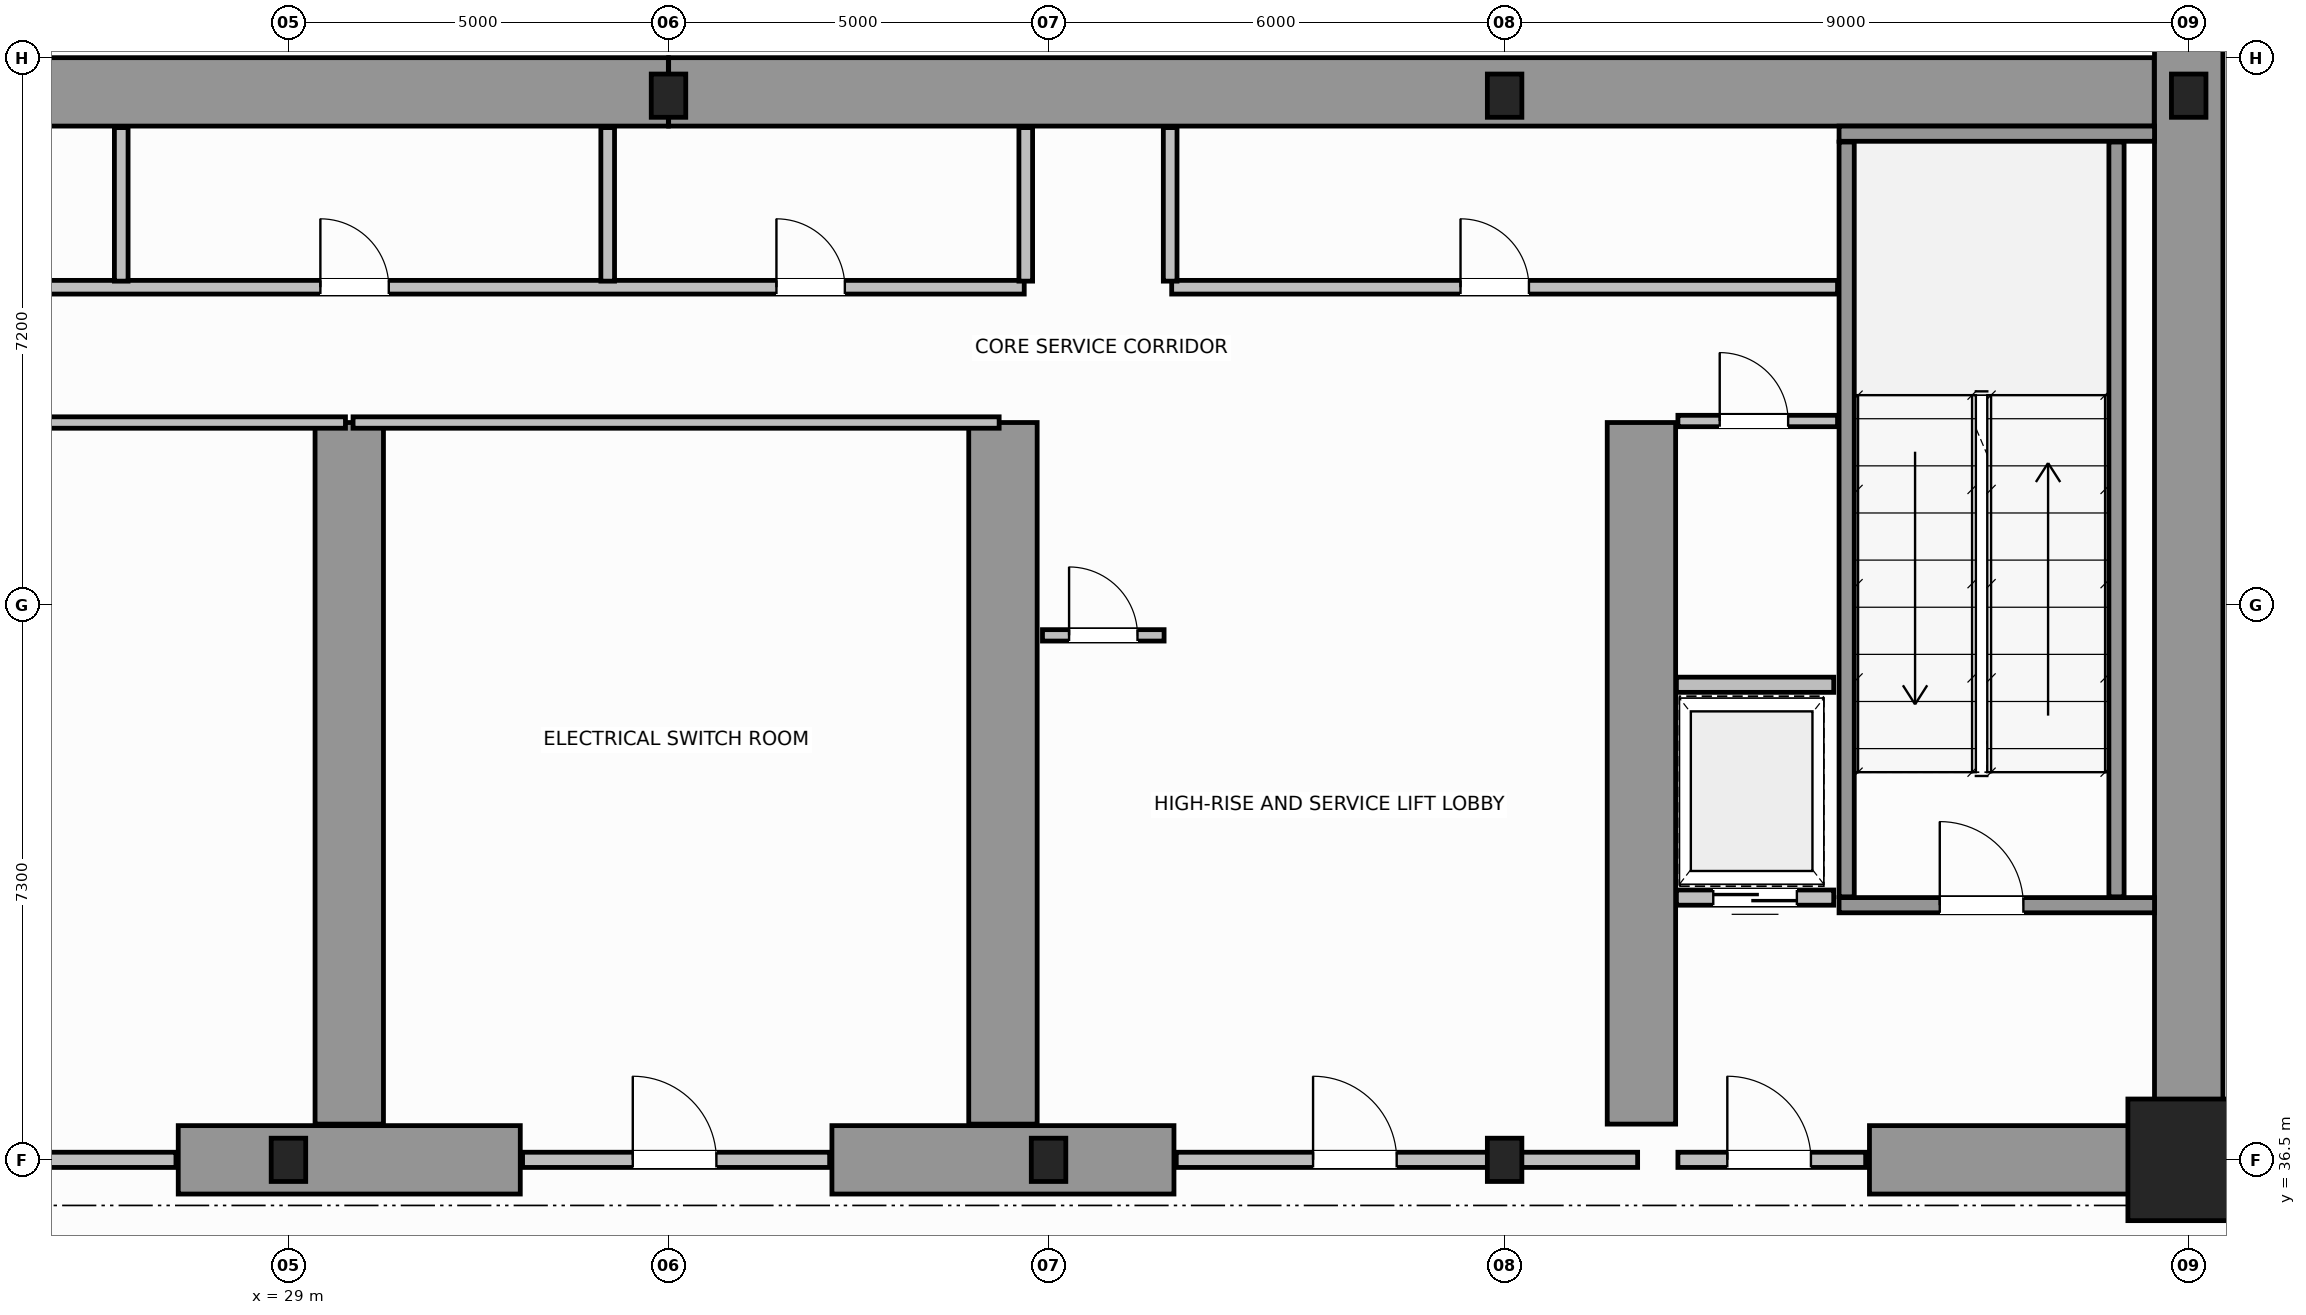
"""IFC4 building model, lengths in metres.
Left out: names, types, materials, properties, quantities, classifications, styles, units other than length and angle.
Written with IfcOpenShell. Run it as: python <this file> out.ifc"""

import sys

from ifc_helpers import new_model, si_unit, direction, frame, frame_2d, origin, origin_2d, place, context, subcontext, project, spatial, rectangle, i_section, extrude, source, transform, mapped, element, fill, save


model = new_model("IFC4")
c1 = context("Model", 3, precision=1e-05, world=origin(), true_north=direction((0.0, 1.0)))
c2 = subcontext(c1, "Body", "Model", "MODEL_VIEW")
j1 = project(units=[si_unit("LENGTHUNIT", "METRE"), si_unit("PLANEANGLEUNIT", "RADIAN")], contexts=[c1])
p1 = place(None, origin())
s1 = spatial("IfcSite", under=j1, at=p1, CompositionType="ELEMENT")
p2 = place(p1, origin())
s2 = spatial("IfcBuilding", under=s1, at=p2, CompositionType="ELEMENT")
p3 = place(p2, frame((0.0, 0.0, -10.4)))
s3 = spatial("IfcBuildingStorey", under=s2, at=p3, CompositionType="ELEMENT", Elevation=-10.4)
m1 = source(origin(), c2, "Body", "SweptSolid", [
    extrude(i_section(OverallWidth=0.454, OverallDepth=0.569, WebThickness=0.078, FlangeThickness=0.08, FilletRadius=0.015, at=origin_2d()), origin(), (0.0, 0.0, 1.0), 5.2),
])
for number, where, z_axis, x_axis in (
    (1, (29.0, 36.5, 0.0), (0.0, 0.0, 1.0), (1.0, 0.0, 0.0)),
    (2, (39.0, 36.5, 0.0), (0.0, 0.0, 1.0), (1.0, 0.0, 0.0)),
    (3, (45.0, 36.5, 0.0), (0.0, 0.0, 1.0), (1.0, 0.0, 0.0)),
):
    element("IfcColumn", number, at=place(p3, frame(where, z_axis=z_axis, x_axis=x_axis)), inside=s3, PredefinedType="COLUMN", context=c2, shape_type="MappedRepresentation", body=[
        mapped(m1, transform((0.0, 0.0, 0.0), scale=1.0)),
    ])
m2 = source(origin(), c2, "Body", "SweptSolid", [
    extrude(rectangle(XDim=1.6, YDim=1.6, at=origin_2d()), origin(), (0.0, 0.0, 1.0), 5.2),
])
p4 = place(p3, frame((54.0, 36.5, 0.0), z_axis=(0.0, 0.0, 1.0), x_axis=(1.0, 0.0, 0.0)))
e4 = element("IfcColumn", 4, at=p4, inside=s3, PredefinedType="COLUMN", context=c2, shape_type="MappedRepresentation", body=[
    mapped(m2, transform((0.0, 0.0, 0.0), scale=1.0)),
])
for number, where, z_axis, x_axis in (
    (5, (34.0, 50.5, 0.0), (0.0, 0.0, 1.0), (1.0, 0.0, 0.0)),
    (6, (45.0, 50.5, 0.0), (0.0, 0.0, 1.0), (1.0, 0.0, 0.0)),
    (7, (54.0, 50.5, 0.0), (0.0, 0.0, 1.0), (1.0, 0.0, 0.0)),
):
    element("IfcColumn", number, at=place(p3, frame(where, z_axis=z_axis, x_axis=x_axis)), inside=s3, PredefinedType="COLUMN", context=c2, shape_type="MappedRepresentation", body=[
        mapped(m1, transform((0.0, 0.0, 0.0), scale=1.0)),
    ])
for number, where, z_axis, x_axis in (
    (8, (14.454, 50.55, 0.0), (0.0, 0.0, 1.0), (1.0, 0.0, 0.0)),
    (9, (34.002, 50.55, 0.0), (0.0, 0.0, 1.0), (1.0, 0.0, 0.0)),
):
    element("IfcWall", number, at=place(p3, frame(where, z_axis=z_axis, x_axis=x_axis)), inside=s3, PredefinedType="SHEAR", context=c2, shape_type="SweptSolid", body=[
        extrude(rectangle(XDim=19.544, YDim=0.9, at=frame_2d((9.772, 0.0))), origin(), (0.0, 0.0, 1.0), 5.2),
    ])
p5 = place(p3, frame((54.0, 36.5, 0.0), z_axis=(0.0, 0.0, 1.0), x_axis=(0.0, 1.0, 0.0)))
e10 = element("IfcWall", 10, at=p5, inside=s3, PredefinedType="SHEAR", context=c2, shape_type="SweptSolid", body=[
    extrude(rectangle(XDim=15.0, YDim=0.9, at=frame_2d((7.5, 0.0))), origin(), (0.0, 0.0, 1.0), 5.2),
])
for number, where, z_axis, x_axis in (
    (11, (27.55, 36.5, 0.0), (0.0, 0.0, 1.0), (1.0, 0.0, 0.0)),
    (12, (36.15, 36.5, 0.0), (0.0, 0.0, 1.0), (1.0, 0.0, 0.0)),
):
    element("IfcWall", number, at=place(p3, frame(where, z_axis=z_axis, x_axis=x_axis)), inside=s3, PredefinedType="SHEAR", context=c2, shape_type="SweptSolid", body=[
        extrude(rectangle(XDim=4.5, YDim=0.9, at=frame_2d((2.25, 0.0))), origin(), (0.0, 0.0, 1.0), 5.2),
    ])
p6 = place(p3, frame((49.8, 36.5, 0.0), z_axis=(0.0, 0.0, 1.0), x_axis=(1.0, 0.0, 0.0)))
e13 = element("IfcWall", 13, at=p6, inside=s3, PredefinedType="SHEAR", context=c2, shape_type="SweptSolid", body=[
    extrude(rectangle(XDim=3.73, YDim=0.9, at=frame_2d((1.865, 0.0))), origin(), (0.0, 0.0, 1.0), 3.68),
])
for number, where, z_axis, x_axis in (
    (14, (29.8, 36.97, 0.0), (0.0, 0.0, 1.0), (0.0, 1.0, 0.0)),
    (15, (38.4, 36.97, 0.0), (0.0, 0.0, 1.0), (0.0, 1.0, 0.0)),
    (16, (46.8, 36.97, 0.0), (0.0, 0.0, 1.0), (0.0, 1.0, 0.0)),
):
    element("IfcWall", number, at=place(p3, frame(where, z_axis=z_axis, x_axis=x_axis)), inside=s3, PredefinedType="SHEAR", context=c2, shape_type="SweptSolid", body=[
        extrude(rectangle(XDim=9.23, YDim=0.9, at=frame_2d((4.615, 0.0))), origin(), (0.0, 0.0, 1.0), 5.2),
    ])
p7 = place(p3, frame((49.4, 39.85, 0.0), z_axis=(0.0, 0.0, 1.0), x_axis=(1.0, 0.0, 0.0)))
e17 = element("IfcWall", 17, at=p7, inside=s3, PredefinedType="SOLIDWALL", context=c2, shape_type="SweptSolid", body=[
    extrude(rectangle(XDim=4.15, YDim=0.2, at=frame_2d((2.075, 0.0))), origin(), (0.0, 0.0, 1.0), 5.2),
])
p8 = place(p7, frame((1.325, 0.0, 0.0)))
e18 = element("IfcOpeningElement", 18, at=p8, cuts=e17, PredefinedType="OPENING", context=c2, shape_type="SweptSolid", body=[
    extrude(rectangle(XDim=1.1, YDim=2.15, at=frame_2d((0.55, 1.075))), frame((0.0, 0.11, 0.0), z_axis=(0.0, -1.0, 0.0), x_axis=(1.0, 0.0, 0.0)), (0.0, 0.0, 1.0), 0.22),
])
p9 = place(p3, frame((49.4, 50.0, 0.0), z_axis=(0.0, 0.0, 1.0), x_axis=(1.0, 0.0, 0.0)))
e19 = element("IfcWall", 19, at=p9, inside=s3, PredefinedType="SOLIDWALL", context=c2, shape_type="SweptSolid", body=[
    extrude(rectangle(XDim=4.15, YDim=0.2, at=frame_2d((2.075, 0.0))), origin(), (0.0, 0.0, 1.0), 5.2),
])
for number, where, z_axis, x_axis in (
    (20, (49.5, 39.96, 0.0), (0.0, 0.0, 1.0), (0.0, 1.0, 0.0)),
    (21, (53.05, 39.96, 0.0), (0.0, 0.0, 1.0), (0.0, 1.0, 0.0)),
):
    element("IfcWall", number, at=place(p3, frame(where, z_axis=z_axis, x_axis=x_axis)), inside=s3, PredefinedType="SOLIDWALL", context=c2, shape_type="SweptSolid", body=[
        extrude(rectangle(XDim=9.93, YDim=0.2, at=frame_2d((4.965, 0.0))), origin(), (0.0, 0.0, 1.0), 5.2),
    ])
p10 = place(p3, frame((47.28, 36.5, 0.0), z_axis=(0.0, 0.0, 1.0), x_axis=(1.0, 0.0, 0.0)))
e22 = element("IfcWall", 22, at=p10, inside=s3, PredefinedType="SOLIDWALL", context=c2, shape_type="SweptSolid", body=[
    extrude(rectangle(XDim=2.47, YDim=0.2, at=frame_2d((1.235, 0.0))), origin(), (0.0, 0.0, 1.0), 3.67),
])
p11 = place(p10, frame((0.65, 0.0, 0.0)))
e23 = element("IfcOpeningElement", 23, at=p11, cuts=e22, PredefinedType="OPENING", context=c2, shape_type="SweptSolid", body=[
    extrude(rectangle(XDim=1.1, YDim=2.15, at=frame_2d((0.55, 1.075))), frame((0.0, 0.11, 0.0), z_axis=(0.0, -1.0, 0.0), x_axis=(1.0, 0.0, 0.0)), (0.0, 0.0, 1.0), 0.22),
])
p12 = place(p3, frame((47.26, 39.95, 0.0), z_axis=(0.0, 0.0, 1.0), x_axis=(1.0, 0.0, 0.0)))
e24 = element("IfcWall", 24, at=p12, inside=s3, PredefinedType="SOLIDWALL", context=c2, shape_type="SweptSolid", body=[
    extrude(rectangle(XDim=2.07, YDim=0.2, at=frame_2d((1.035, 0.0))), origin(), (0.0, 0.0, 1.0), 4.88),
])
p13 = place(p12, frame((0.485, 0.0, 0.0)))
e25 = element("IfcOpeningElement", 25, at=p13, cuts=e24, PredefinedType="OPENING", context=c2, shape_type="SweptSolid", body=[
    extrude(rectangle(XDim=1.1, YDim=2.15, at=frame_2d((0.55, 1.075))), frame((0.0, 0.11, 0.0), z_axis=(0.0, -1.0, 0.0), x_axis=(1.0, 0.0, 0.0)), (0.0, 0.0, 1.0), 0.22),
])
p14 = place(p3, frame((47.26, 42.75, 0.0), z_axis=(0.0, 0.0, 1.0), x_axis=(1.0, 0.0, 0.0)))
e26 = element("IfcWall", 26, at=p14, inside=s3, PredefinedType="SOLIDWALL", context=c2, shape_type="SweptSolid", body=[
    extrude(rectangle(XDim=2.07, YDim=0.2, at=frame_2d((1.035, 0.0))), origin(), (0.0, 0.0, 1.0), 4.88),
])
p15 = place(p3, frame((21.25, 36.5, 0.0), z_axis=(0.0, 0.0, 1.0), x_axis=(1.0, 0.0, 0.0)))
e27 = element("IfcWall", 27, at=p15, inside=s3, PredefinedType="SOLIDWALL", context=c2, shape_type="SweptSolid", body=[
    extrude(rectangle(XDim=6.27, YDim=0.2, at=frame_2d((3.135, 0.0))), origin(), (0.0, 0.0, 1.0), 3.67),
])
p16 = place(p15, frame((2.6, 0.0, 0.0)))
e28 = element("IfcOpeningElement", 28, at=p16, cuts=e27, PredefinedType="OPENING", context=c2, shape_type="SweptSolid", body=[
    extrude(rectangle(XDim=1.1, YDim=2.15, at=frame_2d((0.55, 1.075))), frame((0.0, 0.11, 0.0), z_axis=(0.0, -1.0, 0.0), x_axis=(1.0, 0.0, 0.0)), (0.0, 0.0, 1.0), 0.22),
])
p17 = place(p3, frame((21.25, 46.2, 0.0), z_axis=(0.0, 0.0, 1.0), x_axis=(1.0, 0.0, 0.0)))
e29 = element("IfcWall", 29, at=p17, inside=s3, PredefinedType="PARTITIONING", context=c2, shape_type="SweptSolid", body=[
    extrude(rectangle(XDim=8.5, YDim=0.15, at=frame_2d((4.25, 0.0))), origin(), (0.0, 0.0, 1.0), 4.88),
])
p18 = place(p3, frame((32.08, 36.5, 0.0), z_axis=(0.0, 0.0, 1.0), x_axis=(1.0, 0.0, 0.0)))
e30 = element("IfcWall", 30, at=p18, inside=s3, PredefinedType="SOLIDWALL", context=c2, shape_type="SweptSolid", body=[
    extrude(rectangle(XDim=4.04, YDim=0.2, at=frame_2d((2.02, 0.0))), origin(), (0.0, 0.0, 1.0), 3.96),
])
p19 = place(p18, frame((1.45, 0.0, 0.0)))
e31 = element("IfcOpeningElement", 31, at=p19, cuts=e30, PredefinedType="OPENING", context=c2, shape_type="SweptSolid", body=[
    extrude(rectangle(XDim=1.1, YDim=2.15, at=frame_2d((0.55, 1.075))), frame((0.0, 0.11, 0.0), z_axis=(0.0, -1.0, 0.0), x_axis=(1.0, 0.0, 0.0)), (0.0, 0.0, 1.0), 0.22),
])
p20 = place(p3, frame((29.85, 46.2, 0.0), z_axis=(0.0, 0.0, 1.0), x_axis=(1.0, 0.0, 0.0)))
e32 = element("IfcWall", 32, at=p20, inside=s3, PredefinedType="PARTITIONING", context=c2, shape_type="SweptSolid", body=[
    extrude(rectangle(XDim=8.5, YDim=0.15, at=frame_2d((4.25, 0.0))), origin(), (0.0, 0.0, 1.0), 4.88),
])
p21 = place(p3, frame((40.68, 36.5, 0.0), z_axis=(0.0, 0.0, 1.0), x_axis=(1.0, 0.0, 0.0)))
e33 = element("IfcWall", 33, at=p21, inside=s3, PredefinedType="SOLIDWALL", context=c2, shape_type="SweptSolid", body=[
    extrude(rectangle(XDim=6.07, YDim=0.2, at=frame_2d((3.035, 0.0))), origin(), (0.0, 0.0, 1.0), 3.67),
])
p22 = place(p21, frame((1.8, 0.0, 0.0)))
e34 = element("IfcOpeningElement", 34, at=p22, cuts=e33, PredefinedType="OPENING", context=c2, shape_type="SweptSolid", body=[
    extrude(rectangle(XDim=1.1, YDim=2.15, at=frame_2d((0.55, 1.075))), frame((0.0, 0.11, 0.0), z_axis=(0.0, -1.0, 0.0), x_axis=(1.0, 0.0, 0.0)), (0.0, 0.0, 1.0), 0.22),
])
p23 = place(p3, frame((47.28, 46.22, 0.0), z_axis=(0.0, 0.0, 1.0), x_axis=(1.0, 0.0, 0.0)))
e35 = element("IfcWall", 35, at=p23, inside=s3, PredefinedType="PARTITIONING", context=c2, shape_type="SweptSolid", body=[
    extrude(rectangle(XDim=2.1, YDim=0.15, at=frame_2d((1.05, 0.0))), origin(), (0.0, 0.0, 1.0), 4.88),
])
p24 = place(p23, frame((0.55, 0.0, 0.0)))
e36 = element("IfcOpeningElement", 36, at=p24, cuts=e35, PredefinedType="OPENING", context=c2, shape_type="SweptSolid", body=[
    extrude(rectangle(XDim=0.9, YDim=2.1, at=frame_2d((0.45, 1.05))), frame((0.0, 0.085, 0.0), z_axis=(0.0, -1.0, 0.0), x_axis=(1.0, 0.0, 0.0)), (0.0, 0.0, 1.0), 0.17),
])
p25 = place(p3, frame((38.92, 43.4, 0.0), z_axis=(0.0, 0.0, 1.0), x_axis=(1.0, 0.0, 0.0)))
e37 = element("IfcWall", 37, at=p25, inside=s3, PredefinedType="PARTITIONING", context=c2, shape_type="SweptSolid", body=[
    extrude(rectangle(XDim=1.6, YDim=0.15, at=frame_2d((0.8, 0.0))), origin(), (0.0, 0.0, 1.0), 4.88),
])
p26 = place(p25, frame((0.35, 0.0, 0.0)))
e38 = element("IfcOpeningElement", 38, at=p26, cuts=e37, PredefinedType="OPENING", context=c2, shape_type="SweptSolid", body=[
    extrude(rectangle(XDim=0.9, YDim=2.1, at=frame_2d((0.45, 1.05))), frame((0.0, 0.085, 0.0), z_axis=(0.0, -1.0, 0.0), x_axis=(1.0, 0.0, 0.0)), (0.0, 0.0, 1.0), 0.17),
])
p27 = place(p3, frame((18.62, 47.98, 0.0), z_axis=(0.0, 0.0, 1.0), x_axis=(1.0, 0.0, 0.0)))
e39 = element("IfcWall", 39, at=p27, inside=s3, PredefinedType="PLUMBINGWALL", context=c2, shape_type="SweptSolid", body=[
    extrude(rectangle(XDim=20.06, YDim=0.18, at=frame_2d((10.03, 0.0))), origin(), (0.0, 0.0, 1.0), 4.88),
])
p28 = place(p27, frame((3.5, 0.0, 0.0)))
e40 = element("IfcOpeningElement", 40, at=p28, cuts=e39, PredefinedType="OPENING", context=c2, shape_type="SweptSolid", body=[
    extrude(rectangle(XDim=0.9, YDim=2.15, at=frame_2d((0.45, 1.075))), frame((0.0, 0.1, 0.0), z_axis=(0.0, -1.0, 0.0), x_axis=(1.0, 0.0, 0.0)), (0.0, 0.0, 1.0), 0.2),
])
p29 = place(p27, frame((10.8, 0.0, 0.0)))
e41 = element("IfcOpeningElement", 41, at=p29, cuts=e39, PredefinedType="OPENING", context=c2, shape_type="SweptSolid", body=[
    extrude(rectangle(XDim=0.9, YDim=2.15, at=frame_2d((0.45, 1.075))), frame((0.0, 0.1, 0.0), z_axis=(0.0, -1.0, 0.0), x_axis=(1.0, 0.0, 0.0)), (0.0, 0.0, 1.0), 0.2),
])
p30 = place(p27, frame((16.8, 0.0, 0.0)))
e42 = element("IfcOpeningElement", 42, at=p30, cuts=e39, PredefinedType="OPENING", context=c2, shape_type="SweptSolid", body=[
    extrude(rectangle(XDim=0.9, YDim=2.15, at=frame_2d((0.45, 1.075))), frame((0.0, 0.1, 0.0), z_axis=(0.0, -1.0, 0.0), x_axis=(1.0, 0.0, 0.0)), (0.0, 0.0, 1.0), 0.2),
])
p31 = place(p3, frame((40.62, 47.98, 0.0), z_axis=(0.0, 0.0, 1.0), x_axis=(1.0, 0.0, 0.0)))
e43 = element("IfcWall", 43, at=p31, inside=s3, PredefinedType="PLUMBINGWALL", context=c2, shape_type="SweptSolid", body=[
    extrude(rectangle(XDim=8.76, YDim=0.18, at=frame_2d((4.38, 0.0))), origin(), (0.0, 0.0, 1.0), 4.88),
])
p32 = place(p31, frame((3.8, 0.0, 0.0)))
e44 = element("IfcOpeningElement", 44, at=p32, cuts=e43, PredefinedType="OPENING", context=c2, shape_type="SweptSolid", body=[
    extrude(rectangle(XDim=0.9, YDim=2.15, at=frame_2d((0.45, 1.075))), frame((0.0, 0.1, 0.0), z_axis=(0.0, -1.0, 0.0), x_axis=(1.0, 0.0, 0.0)), (0.0, 0.0, 1.0), 0.2),
])
for number, where, z_axis, x_axis in (
    (45, (26.8, 48.06, 0.0), (0.0, 0.0, 1.0), (0.0, 1.0, 0.0)),
    (46, (33.2, 48.06, 0.0), (0.0, 0.0, 1.0), (0.0, 1.0, 0.0)),
    (47, (38.7, 48.06, 0.0), (0.0, 0.0, 1.0), (0.0, 1.0, 0.0)),
    (48, (40.6, 48.06, 0.0), (0.0, 0.0, 1.0), (0.0, 1.0, 0.0)),
):
    element("IfcWall", number, at=place(p3, frame(where, z_axis=z_axis, x_axis=x_axis)), inside=s3, PredefinedType="PLUMBINGWALL", context=c2, shape_type="SweptSolid", body=[
        extrude(rectangle(XDim=2.02, YDim=0.18, at=frame_2d((1.01, 0.0))), origin(), (0.0, 0.0, 1.0), 4.88),
    ])
m3 = source(origin(), c2, "Body", "SweptSolid", [
    extrude(rectangle(XDim=1.1, YDim=2.15, at=frame_2d((0.55, 1.075))), frame((0.0, 0.025, 0.0), z_axis=(0.0, -1.0, 0.0), x_axis=(1.0, 0.0, 0.0)), (0.0, 0.0, 1.0), 0.05),
])
p33 = place(p8, origin())
e49 = element("IfcDoor", 49, at=p33, inside=s3, OperationType="SINGLE_SWING_RIGHT", PredefinedType="DOOR", context=c2, shape_type="MappedRepresentation", body=[
    mapped(m3, transform((0.0, 0.0, 0.0), scale=1.0)),
])
fill(e18, e49)
p34 = place(p11, origin())
e50 = element("IfcDoor", 50, at=p34, inside=s3, OperationType="SINGLE_SWING_LEFT", PredefinedType="DOOR", context=c2, shape_type="MappedRepresentation", body=[
    mapped(m3, transform((0.0, 0.0, 0.0), scale=1.0)),
])
fill(e23, e50)
p35 = place(p13, origin())
e51 = element("IfcDoor", 51, at=p35, inside=s3, OperationType="DOUBLE_DOOR_SLIDING", PredefinedType="DOOR", context=c2, shape_type="MappedRepresentation", body=[
    mapped(m3, transform((0.0, 0.0, 0.0), scale=1.0)),
])
fill(e25, e51)
p36 = place(p19, origin())
e52 = element("IfcDoor", 52, at=p36, inside=s3, OperationType="SINGLE_SWING_RIGHT", PredefinedType="DOOR", context=c2, shape_type="MappedRepresentation", body=[
    mapped(m3, transform((0.0, 0.0, 0.0), scale=1.0)),
])
fill(e31, e52)
p37 = place(p22, origin())
e53 = element("IfcDoor", 53, at=p37, inside=s3, OperationType="SINGLE_SWING_LEFT", PredefinedType="DOOR", context=c2, shape_type="MappedRepresentation", body=[
    mapped(m3, transform((0.0, 0.0, 0.0), scale=1.0)),
])
fill(e34, e53)
m4 = source(origin(), c2, "Body", "SweptSolid", [
    extrude(rectangle(XDim=0.9, YDim=2.1, at=frame_2d((0.45, 1.05))), frame((0.0, 0.025, 0.0), z_axis=(0.0, -1.0, 0.0), x_axis=(1.0, 0.0, 0.0)), (0.0, 0.0, 1.0), 0.05),
])
p38 = place(p24, origin())
e54 = element("IfcDoor", 54, at=p38, inside=s3, OperationType="SINGLE_SWING_RIGHT", PredefinedType="DOOR", context=c2, shape_type="MappedRepresentation", body=[
    mapped(m4, transform((0.0, 0.0, 0.0), scale=1.0)),
])
fill(e36, e54)
p39 = place(p26, origin())
e55 = element("IfcDoor", 55, at=p39, inside=s3, OperationType="SINGLE_SWING_LEFT", PredefinedType="DOOR", context=c2, shape_type="MappedRepresentation", body=[
    mapped(m4, transform((0.0, 0.0, 0.0), scale=1.0)),
])
fill(e38, e55)
m5 = source(origin(), c2, "Body", "SweptSolid", [
    extrude(rectangle(XDim=0.9, YDim=2.15, at=frame_2d((0.45, 1.075))), frame((0.0, 0.025, 0.0), z_axis=(0.0, -1.0, 0.0), x_axis=(1.0, 0.0, 0.0)), (0.0, 0.0, 1.0), 0.05),
])
p40 = place(p29, origin())
e56 = element("IfcDoor", 56, at=p40, inside=s3, OperationType="SINGLE_SWING_RIGHT", PredefinedType="DOOR", context=c2, shape_type="MappedRepresentation", body=[
    mapped(m5, transform((0.0, 0.0, 0.0), scale=1.0)),
])
fill(e41, e56)
p41 = place(p30, origin())
e57 = element("IfcDoor", 57, at=p41, inside=s3, OperationType="SINGLE_SWING_LEFT", PredefinedType="DOOR", context=c2, shape_type="MappedRepresentation", body=[
    mapped(m5, transform((0.0, 0.0, 0.0), scale=1.0)),
])
fill(e42, e57)
p42 = place(p32, origin())
e58 = element("IfcDoor", 58, at=p42, inside=s3, OperationType="SINGLE_SWING_RIGHT", PredefinedType="DOOR", context=c2, shape_type="MappedRepresentation", body=[
    mapped(m5, transform((0.0, 0.0, 0.0), scale=1.0)),
])
fill(e44, e58)
save(model, sys.argv[1])
